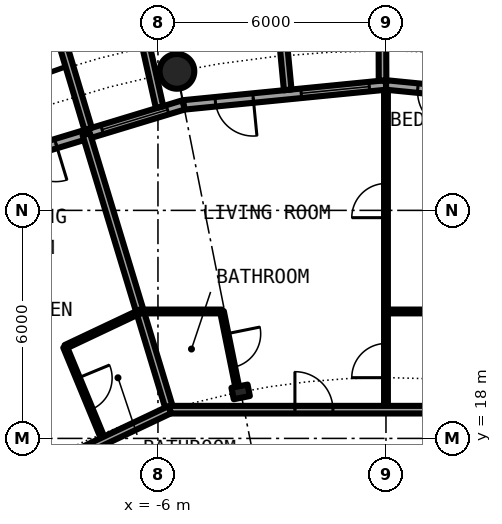
"""IFC4 building model, lengths in metres.
Left out: names, types, materials, properties, quantities, classifications, styles, units other than length and angle.
Written with IfcOpenShell. Run it as: python <this file> out.ifc"""

import sys

from ifc_helpers import new_model, si_unit, direction, frame, frame_2d, origin, origin_2d, place, context, subcontext, project, spatial, rectangle, hollow_circle, i_section, extrude, element, fill, save


model = new_model("IFC4")
c1 = context("Model", 3, precision=1e-05, world=origin(), true_north=direction((0.0, 1.0)))
c2 = subcontext(c1, "Body", "Model", "MODEL_VIEW")
j1 = project(units=[si_unit("LENGTHUNIT", "METRE"), si_unit("PLANEANGLEUNIT", "RADIAN")], contexts=[c1])
p1 = place(None, origin())
s1 = spatial("IfcSite", under=j1, at=p1, CompositionType="ELEMENT")
p2 = place(p1, origin())
s2 = spatial("IfcBuilding", under=s1, at=p2, CompositionType="ELEMENT")
p3 = place(p2, frame((0.0, 0.0, 117.75)))
s3 = spatial("IfcBuildingStorey", under=s2, at=p3, CompositionType="ELEMENT", Elevation=117.75)
p4 = place(p3, frame((-5.501, 27.658, 0.0), z_axis=(0.0, 0.0, 1.0), x_axis=(1.0, 0.0, 0.0)))
e1 = element("IfcColumn", 1, at=p4, inside=s3, PredefinedType="COLUMN", context=c2, shape_type="SweptSolid", body=[
    extrude(hollow_circle(Radius=0.457, WallThickness=0.04, at=origin_2d()), origin(), (0.0, 0.0, 1.0), 3.05),
])
p5 = place(p3, frame((-3.824, 19.223, 0.0), z_axis=(0.0, 0.0, 1.0), x_axis=(-0.195090322016, 0.980785280403, 0.0)))
e2 = element("IfcColumn", 2, at=p5, inside=s3, PredefinedType="COLUMN", context=c2, shape_type="SweptSolid", body=[
    extrude(i_section(OverallWidth=0.307, OverallDepth=0.432, WebThickness=0.021, FlangeThickness=0.04, FilletRadius=0.027, at=origin_2d()), origin(), (0.0, 0.0, 1.0), 3.05),
])
p6 = place(p3, frame((5.326, 26.775, 0.0), z_axis=(0.0, 0.0, 1.0), x_axis=(-0.995173996315, 0.098126026407, 0.0)))
e3 = element("IfcWall", 3, at=p6, inside=s3, PredefinedType="SOLIDWALL", context=c2, shape_type="SweptSolid", body=[
    extrude(rectangle(XDim=5.352, YDim=0.25, at=frame_2d((2.676, 0.0))), origin(), (0.0, 0.0, 1.0), 2.7),
])
p7 = place(p6, frame((0.441, 0.0, 0.3)))
e4 = element("IfcOpeningElement", 4, at=p7, cuts=e3, PredefinedType="OPENING", context=c2, shape_type="SweptSolid", body=[
    extrude(rectangle(XDim=1.8, YDim=2.1, at=frame_2d((0.9, 1.05))), frame((0.0, 0.135, 0.0), z_axis=(0.0, -1.0, 0.0), x_axis=(1.0, 0.0, 0.0)), (0.0, 0.0, 1.0), 0.27),
])
p8 = place(p6, frame((3.51, 0.0, 0.0)))
e5 = element("IfcOpeningElement", 5, at=p8, cuts=e3, PredefinedType="OPENING", context=c2, shape_type="SweptSolid", body=[
    extrude(rectangle(XDim=1.0, YDim=2.2, at=frame_2d((0.5, 1.1))), frame((0.0, 0.135, 0.0), z_axis=(0.0, -1.0, 0.0), x_axis=(1.0, 0.0, 0.0)), (0.0, 0.0, 1.0), 0.27),
])
p9 = place(p3, frame((0.0, 27.3, 0.0), z_axis=(0.0, 0.0, 1.0), x_axis=(-0.995173996315, -0.098126026407, 0.0)))
e6 = element("IfcWall", 6, at=p9, inside=s3, PredefinedType="SOLIDWALL", context=c2, shape_type="SweptSolid", body=[
    extrude(rectangle(XDim=5.352, YDim=0.25, at=frame_2d((2.676, 0.0))), origin(), (0.0, 0.0, 1.0), 2.7),
])
p10 = place(p9, frame((0.441, 0.0, 0.3)))
e7 = element("IfcOpeningElement", 7, at=p10, cuts=e6, PredefinedType="OPENING", context=c2, shape_type="SweptSolid", body=[
    extrude(rectangle(XDim=1.8, YDim=2.1, at=frame_2d((0.9, 1.05))), frame((0.0, 0.135, 0.0), z_axis=(0.0, -1.0, 0.0), x_axis=(1.0, 0.0, 0.0)), (0.0, 0.0, 1.0), 0.27),
])
p11 = place(p9, frame((3.51, 0.0, 0.0)))
e8 = element("IfcOpeningElement", 8, at=p11, cuts=e6, PredefinedType="OPENING", context=c2, shape_type="SweptSolid", body=[
    extrude(rectangle(XDim=1.0, YDim=2.2, at=frame_2d((0.5, 1.1))), frame((0.0, 0.135, 0.0), z_axis=(0.0, -1.0, 0.0), x_axis=(1.0, 0.0, 0.0)), (0.0, 0.0, 1.0), 0.27),
])
p12 = place(p3, frame((-0.09, 27.417, -0.03), z_axis=(0.0, 0.0, 1.0), x_axis=(-0.00347308367, 0.999993968827, 0.0)))
e9 = element("IfcWall", 9, at=p12, inside=s3, PredefinedType="SOLIDWALL", context=c2, shape_type="SweptSolid", body=[
    extrude(rectangle(XDim=2.882, YDim=0.2, at=frame_2d((1.441, 0.0))), origin(), (0.0, 0.0, 1.0), 2.73),
])
p13 = place(p3, frame((-2.586, 27.171, -0.03), z_axis=(0.0, 0.0, 1.0), x_axis=(-0.094548432284, 0.995520262954, 0.0)))
e10 = element("IfcWall", 10, at=p13, inside=s3, PredefinedType="SOLIDWALL", context=c2, shape_type="SweptSolid", body=[
    extrude(rectangle(XDim=3.006, YDim=0.2, at=frame_2d((1.503, 0.0))), origin(), (0.0, 0.0, 1.0), 2.73),
])
p14 = place(p3, frame((-5.326, 26.775, 0.0), z_axis=(0.0, 0.0, 1.0), x_axis=(-0.956965678721, -0.290201119486, 0.0)))
e11 = element("IfcWall", 11, at=p14, inside=s3, PredefinedType="SOLIDWALL", context=c2, shape_type="SweptSolid", body=[
    extrude(rectangle(XDim=5.351, YDim=0.25, at=frame_2d((2.676, 0.0))), origin(), (0.0, 0.0, 1.0), 2.7),
])
p15 = place(p14, frame((0.441, 0.0, 0.3)))
e12 = element("IfcOpeningElement", 12, at=p15, cuts=e11, PredefinedType="OPENING", context=c2, shape_type="SweptSolid", body=[
    extrude(rectangle(XDim=1.8, YDim=2.1, at=frame_2d((0.9, 1.05))), frame((0.0, 0.135, 0.0), z_axis=(0.0, -1.0, 0.0), x_axis=(1.0, 0.0, 0.0)), (0.0, 0.0, 1.0), 0.27),
])
p16 = place(p14, frame((3.51, 0.0, 0.0)))
e13 = element("IfcOpeningElement", 13, at=p16, cuts=e11, PredefinedType="OPENING", context=c2, shape_type="SweptSolid", body=[
    extrude(rectangle(XDim=1.0, YDim=2.2, at=frame_2d((0.5, 1.1))), frame((0.0, 0.135, 0.0), z_axis=(0.0, -1.0, 0.0), x_axis=(1.0, 0.0, 0.0)), (0.0, 0.0, 1.0), 0.27),
])
p17 = place(p3, frame((-5.957, 26.715, -0.03), z_axis=(0.0, 0.0, 1.0), x_axis=(-0.217857287091, 0.975980636315, 0.0)))
e14 = element("IfcWall", 14, at=p17, inside=s3, PredefinedType="SOLIDWALL", context=c2, shape_type="SweptSolid", body=[
    extrude(rectangle(XDim=2.928, YDim=0.2, at=frame_2d((1.464, 0.0))), origin(), (0.0, 0.0, 1.0), 2.73),
])
p18 = place(p3, frame((-7.837, 26.144, -0.03), z_axis=(0.0, 0.0, 1.0), x_axis=(-0.287064767992, 0.957911174889, 0.0)))
e15 = element("IfcWall", 15, at=p18, inside=s3, PredefinedType="SOLIDWALL", context=c2, shape_type="SweptSolid", body=[
    extrude(rectangle(XDim=3.006, YDim=0.2, at=frame_2d((1.503, 0.0))), origin(), (0.0, 0.0, 1.0), 2.73),
])
p19 = place(p3, frame((-7.887, 26.005, 0.0), z_axis=(0.0, 0.0, 1.0), x_axis=(0.29005838641, -0.957008951094, 0.0)))
e16 = element("IfcWall", 16, at=p19, inside=s3, PredefinedType="PARTITIONING", context=c2, shape_type="SweptSolid", body=[
    extrude(rectangle(XDim=7.574, YDim=0.2, at=frame_2d((3.787, 0.0))), origin(), (0.0, 0.0, 1.0), 2.7),
])
p20 = place(p3, frame((-8.445, 20.407, 0.0), z_axis=(0.0, 0.0, 1.0), x_axis=(0.382195876364, -0.924081334132, 0.0)))
e17 = element("IfcWall", 17, at=p20, inside=s3, PredefinedType="PARTITIONING", context=c2, shape_type="SweptSolid", body=[
    extrude(rectangle(XDim=2.674, YDim=0.1, at=frame_2d((1.337, 0.0))), origin(), (0.0, 0.0, 1.0), 2.7),
])
p21 = place(p20, frame((0.887, 0.0, 0.0)))
e18 = element("IfcOpeningElement", 18, at=p21, cuts=e17, PredefinedType="OPENING", context=c2, shape_type="SweptSolid", body=[
    extrude(rectangle(XDim=0.9, YDim=2.3, at=frame_2d((0.45, 1.15))), frame((0.0, 0.06, 0.0), z_axis=(0.0, -1.0, 0.0), x_axis=(1.0, 0.0, 0.0)), (0.0, 0.0, 1.0), 0.12),
])
p22 = place(p3, frame((-4.316, 21.34, 0.0), z_axis=(0.0, 0.0, 1.0), x_axis=(0.198348087074, -0.980131642359, 0.0)))
e19 = element("IfcWall", 19, at=p22, inside=s3, PredefinedType="PARTITIONING", context=c2, shape_type="SweptSolid", body=[
    extrude(rectangle(XDim=1.956, YDim=0.1, at=frame_2d((0.978, 0.0))), origin(), (0.0, 0.0, 1.0), 2.7),
])
p23 = place(p22, frame((0.6, 0.0, 0.0)))
e20 = element("IfcOpeningElement", 20, at=p23, cuts=e19, PredefinedType="OPENING", context=c2, shape_type="SweptSolid", body=[
    extrude(rectangle(XDim=0.9, YDim=2.3, at=frame_2d((0.45, 1.15))), frame((0.0, 0.06, 0.0), z_axis=(0.0, -1.0, 0.0), x_axis=(1.0, 0.0, 0.0)), (0.0, 0.0, 1.0), 0.12),
])
p24 = place(p3, frame((0.0, 18.756, 0.0), z_axis=(0.0, 0.0, 1.0), x_axis=(0.0, 1.0, 0.0)))
e21 = element("IfcWall", 21, at=p24, inside=s3, PredefinedType="PARTITIONING", context=c2, shape_type="SweptSolid", body=[
    extrude(rectangle(XDim=8.419, YDim=0.1, at=frame_2d((4.209, 0.0))), origin(), (0.0, 0.0, 1.0), 2.7),
])
p25 = place(p24, frame((0.842, 0.0, 0.0)))
e22 = element("IfcOpeningElement", 22, at=p25, cuts=e21, PredefinedType="OPENING", context=c2, shape_type="SweptSolid", body=[
    extrude(rectangle(XDim=0.9, YDim=2.3, at=frame_2d((0.45, 1.15))), frame((0.0, 0.06, 0.0), z_axis=(0.0, -1.0, 0.0), x_axis=(1.0, 0.0, 0.0)), (0.0, 0.0, 1.0), 0.12),
])
p26 = place(p24, frame((5.052, 0.0, 0.0)))
e23 = element("IfcOpeningElement", 23, at=p26, cuts=e21, PredefinedType="OPENING", context=c2, shape_type="SweptSolid", body=[
    extrude(rectangle(XDim=0.9, YDim=2.3, at=frame_2d((0.45, 1.15))), frame((0.0, 0.06, 0.0), z_axis=(0.0, -1.0, 0.0), x_axis=(1.0, 0.0, 0.0)), (0.0, 0.0, 1.0), 0.12),
])
p27 = place(p3, frame((-5.69, 18.756, 0.0), z_axis=(0.0, 0.0, 1.0), x_axis=(1.0, 0.0, 0.0)))
e24 = element("IfcWall", 24, at=p27, inside=s3, PredefinedType="PARTITIONING", context=c2, shape_type="SweptSolid", body=[
    extrude(rectangle(XDim=11.38, YDim=0.2, at=frame_2d((5.69, 0.0))), origin(), (0.0, 0.0, 1.0), 2.7),
])
p28 = place(p27, frame((3.294, 0.0, 0.0)))
e25 = element("IfcOpeningElement", 25, at=p28, cuts=e24, PredefinedType="OPENING", context=c2, shape_type="SweptSolid", body=[
    extrude(rectangle(XDim=1.0, YDim=2.3, at=frame_2d((0.5, 1.15))), frame((0.0, 0.11, 0.0), z_axis=(0.0, -1.0, 0.0), x_axis=(1.0, 0.0, 0.0)), (0.0, 0.0, 1.0), 0.22),
])
p29 = place(p3, frame((-10.748, 16.362, 0.0), z_axis=(0.0, 0.0, 1.0), x_axis=(0.903869270233, 0.427808768409, 0.0)))
e26 = element("IfcWall", 26, at=p29, inside=s3, PredefinedType="PARTITIONING", context=c2, shape_type="SweptSolid", body=[
    extrude(rectangle(XDim=5.596, YDim=0.2, at=frame_2d((2.798, 0.0))), origin(), (0.0, 0.0, 1.0), 2.39),
])
p30 = place(p29, frame((1.262, 0.0, 0.0)))
e27 = element("IfcOpeningElement", 27, at=p30, cuts=e26, PredefinedType="OPENING", context=c2, shape_type="SweptSolid", body=[
    extrude(rectangle(XDim=1.0, YDim=2.3, at=frame_2d((0.5, 1.15))), frame((0.0, 0.11, 0.0), z_axis=(0.0, -1.0, 0.0), x_axis=(1.0, 0.0, 0.0)), (0.0, 0.0, 1.0), 0.22),
])
p31 = place(p3, frame((-6.473, 21.34, 0.0), z_axis=(0.0, 0.0, 1.0), x_axis=(1.0, 0.0, 0.0)))
e28 = element("IfcWall", 28, at=p31, inside=s3, PredefinedType="PARTITIONING", context=c2, shape_type="SweptSolid", body=[
    extrude(rectangle(XDim=2.157, YDim=0.1, at=frame_2d((1.079, 0.0))), origin(), (0.0, 0.0, 1.0), 2.7),
])
p32 = place(p3, frame((0.0, 21.34, 0.0), z_axis=(0.0, 0.0, 1.0), x_axis=(1.0, 0.0, 0.0)))
e29 = element("IfcWall", 29, at=p32, inside=s3, PredefinedType="PARTITIONING", context=c2, shape_type="SweptSolid", body=[
    extrude(rectangle(XDim=6.473, YDim=0.1, at=frame_2d((3.236, 0.0))), origin(), (0.0, 0.0, 1.0), 2.7),
])
p33 = place(p3, frame((-8.436, 20.41, 0.0), z_axis=(0.0, 0.0, 1.0), x_axis=(0.904081702397, 0.427359655782, 0.0)))
e30 = element("IfcWall", 30, at=p33, inside=s3, PredefinedType="PARTITIONING", context=c2, shape_type="SweptSolid", body=[
    extrude(rectangle(XDim=2.181, YDim=0.1, at=frame_2d((1.091, 0.0))), origin(), (0.0, 0.0, 1.0), 2.7),
])
p34 = place(p8, origin())
e31 = element("IfcDoor", 31, at=p34, inside=s3, OperationType="SINGLE_SWING_LEFT", PredefinedType="DOOR", context=c2, shape_type="SweptSolid", body=[
    extrude(rectangle(XDim=1.0, YDim=2.2, at=frame_2d((0.5, 1.1))), frame((0.0, 0.025, 0.0), z_axis=(0.0, -1.0, 0.0), x_axis=(1.0, 0.0, 0.0)), (0.0, 0.0, 1.0), 0.05),
])
fill(e5, e31)
p35 = place(p10, origin())
e32 = element("IfcWindow", 32, at=p35, inside=s3, PartitioningType="SINGLE_PANEL", PredefinedType="WINDOW", context=c2, shape_type="SweptSolid", body=[
    extrude(rectangle(XDim=1.8, YDim=2.1, at=frame_2d((0.9, 1.05))), frame((0.0, 0.03, 0.0), z_axis=(0.0, -1.0, 0.0), x_axis=(1.0, 0.0, 0.0)), (0.0, 0.0, 1.0), 0.06),
])
fill(e7, e32)
p36 = place(p11, origin())
e33 = element("IfcDoor", 33, at=p36, inside=s3, OperationType="SINGLE_SWING_LEFT", PredefinedType="DOOR", context=c2, shape_type="SweptSolid", body=[
    extrude(rectangle(XDim=1.0, YDim=2.2, at=frame_2d((0.5, 1.1))), frame((0.0, 0.025, 0.0), z_axis=(0.0, -1.0, 0.0), x_axis=(1.0, 0.0, 0.0)), (0.0, 0.0, 1.0), 0.05),
])
fill(e8, e33)
p37 = place(p15, origin())
e34 = element("IfcWindow", 34, at=p37, inside=s3, PartitioningType="SINGLE_PANEL", PredefinedType="WINDOW", context=c2, shape_type="SweptSolid", body=[
    extrude(rectangle(XDim=1.8, YDim=2.1, at=frame_2d((0.9, 1.05))), frame((0.0, 0.03, 0.0), z_axis=(0.0, -1.0, 0.0), x_axis=(1.0, 0.0, 0.0)), (0.0, 0.0, 1.0), 0.06),
])
fill(e12, e34)
p38 = place(p16, origin())
e35 = element("IfcDoor", 35, at=p38, inside=s3, OperationType="SINGLE_SWING_LEFT", PredefinedType="DOOR", context=c2, shape_type="SweptSolid", body=[
    extrude(rectangle(XDim=1.0, YDim=2.2, at=frame_2d((0.5, 1.1))), frame((0.0, 0.025, 0.0), z_axis=(0.0, -1.0, 0.0), x_axis=(1.0, 0.0, 0.0)), (0.0, 0.0, 1.0), 0.05),
])
fill(e13, e35)
p39 = place(p28, origin())
e36 = element("IfcDoor", 36, at=p39, inside=s3, OperationType="SINGLE_SWING_LEFT", PredefinedType="DOOR", context=c2, shape_type="SweptSolid", body=[
    extrude(rectangle(XDim=1.0, YDim=2.3, at=frame_2d((0.5, 1.15))), frame((0.0, 0.025, 0.0), z_axis=(0.0, -1.0, 0.0), x_axis=(1.0, 0.0, 0.0)), (0.0, 0.0, 1.0), 0.05),
])
fill(e25, e36)
p40 = place(p23, origin())
e37 = element("IfcDoor", 37, at=p40, inside=s3, OperationType="SINGLE_SWING_RIGHT", PredefinedType="DOOR", context=c2, shape_type="SweptSolid", body=[
    extrude(rectangle(XDim=0.9, YDim=2.3, at=frame_2d((0.45, 1.15))), frame((0.0, 0.025, 0.0), z_axis=(0.0, -1.0, 0.0), x_axis=(1.0, 0.0, 0.0)), (0.0, 0.0, 1.0), 0.05),
])
fill(e20, e37)
p41 = place(p25, origin())
e38 = element("IfcDoor", 38, at=p41, inside=s3, OperationType="SINGLE_SWING_LEFT", PredefinedType="DOOR", context=c2, shape_type="SweptSolid", body=[
    extrude(rectangle(XDim=0.9, YDim=2.3, at=frame_2d((0.45, 1.15))), frame((0.0, 0.025, 0.0), z_axis=(0.0, -1.0, 0.0), x_axis=(1.0, 0.0, 0.0)), (0.0, 0.0, 1.0), 0.05),
])
fill(e22, e38)
p42 = place(p26, origin())
e39 = element("IfcDoor", 39, at=p42, inside=s3, OperationType="SINGLE_SWING_RIGHT", PredefinedType="DOOR", context=c2, shape_type="SweptSolid", body=[
    extrude(rectangle(XDim=0.9, YDim=2.3, at=frame_2d((0.45, 1.15))), frame((0.0, 0.025, 0.0), z_axis=(0.0, -1.0, 0.0), x_axis=(1.0, 0.0, 0.0)), (0.0, 0.0, 1.0), 0.05),
])
fill(e23, e39)
p43 = place(p21, origin())
e40 = element("IfcDoor", 40, at=p43, inside=s3, OperationType="SINGLE_SWING_RIGHT", PredefinedType="DOOR", context=c2, shape_type="SweptSolid", body=[
    extrude(rectangle(XDim=0.9, YDim=2.3, at=frame_2d((0.45, 1.15))), frame((0.0, 0.025, 0.0), z_axis=(0.0, -1.0, 0.0), x_axis=(1.0, 0.0, 0.0)), (0.0, 0.0, 1.0), 0.05),
])
fill(e18, e40)
save(model, sys.argv[1])
